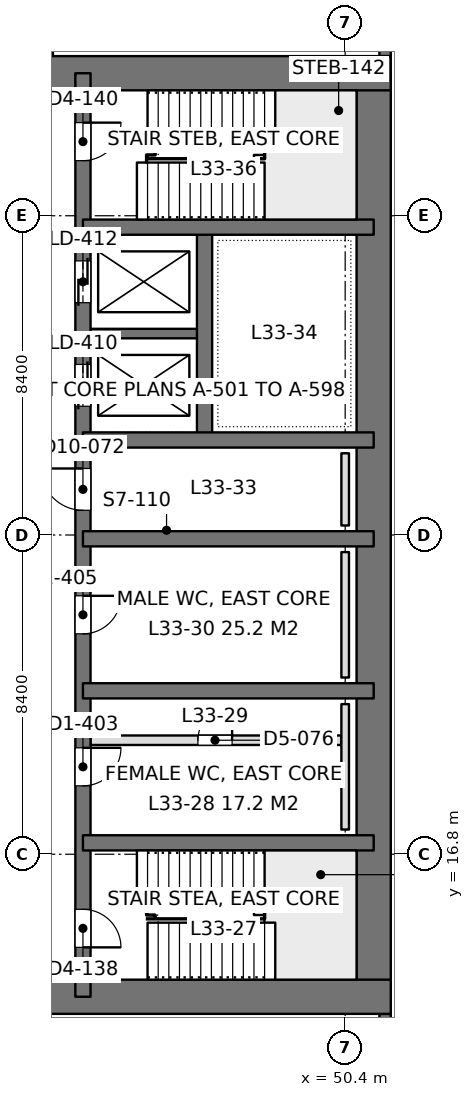
"""IFC4 building model, lengths in metres.
Left out: names, types, materials, properties, quantities, classifications, styles, units other than length and angle.
Written with IfcOpenShell. Run it as: python <this file> out.ifc"""

import sys

from ifc_helpers import new_model, si_unit, direction, frame, frame_2d, origin, place, context, subcontext, project, spatial, rectangle, extrude, element, fill, save


model = new_model("IFC4")
c1 = context("Model", 3, precision=1e-05, world=origin(), true_north=direction((0.0, 1.0)))
c2 = subcontext(c1, "Body", "Model", "MODEL_VIEW")
j1 = project(units=[si_unit("LENGTHUNIT", "METRE"), si_unit("PLANEANGLEUNIT", "RADIAN")], contexts=[c1])
p1 = place(None, origin())
s1 = spatial("IfcSite", under=j1, at=p1, CompositionType="ELEMENT")
p2 = place(p1, origin())
s2 = spatial("IfcBuilding", under=s1, at=p2, CompositionType="ELEMENT")
p3 = place(p2, frame((0.0, 0.0, 147.0)))
s3 = spatial("IfcBuildingStorey", under=s2, at=p3, CompositionType="ELEMENT", Elevation=147.0)
p4 = place(p3, frame((33.6, 13.05, 0.0), z_axis=(0.0, 0.0, 1.0), x_axis=(1.0, 0.0, 0.0)))
e1 = element("IfcWall", 1, at=p4, inside=s3, PredefinedType="SHEAR", context=c2, shape_type="SweptSolid", body=[
    extrude(rectangle(XDim=18.0, YDim=0.9, at=frame_2d((9.0, 0.0))), origin(), (0.0, 0.0, 1.0), 4.2),
])
p5 = place(p4, frame((7.25, 0.0, 0.0)))
e2 = element("IfcOpeningElement", 2, at=p5, cuts=e1, PredefinedType="OPENING", context=c2, shape_type="SweptSolid", body=[
    extrude(rectangle(XDim=1.8, YDim=2.4, at=frame_2d((0.9, 1.2))), frame((0.0, 0.46, 0.0), z_axis=(0.0, -1.0, 0.0), x_axis=(1.0, 0.0, 0.0)), (0.0, 0.0, 1.0), 0.92),
])
p6 = place(p3, frame((33.6, 37.35, 0.0), z_axis=(0.0, 0.0, 1.0), x_axis=(1.0, 0.0, 0.0)))
e3 = element("IfcWall", 3, at=p6, inside=s3, PredefinedType="SHEAR", context=c2, shape_type="SweptSolid", body=[
    extrude(rectangle(XDim=18.0, YDim=0.9, at=frame_2d((9.0, 0.0))), origin(), (0.0, 0.0, 1.0), 4.2),
])
p7 = place(p6, frame((7.25, 0.0, 0.0)))
e4 = element("IfcOpeningElement", 4, at=p7, cuts=e3, PredefinedType="OPENING", context=c2, shape_type="SweptSolid", body=[
    extrude(rectangle(XDim=1.8, YDim=2.4, at=frame_2d((0.9, 1.2))), frame((0.0, 0.46, 0.0), z_axis=(0.0, -1.0, 0.0), x_axis=(1.0, 0.0, 0.0)), (0.0, 0.0, 1.0), 0.92),
])
p8 = place(p3, frame((51.15, 13.05, 0.0), z_axis=(0.0, 0.0, 1.0), x_axis=(0.0, 1.0, 0.0)))
e5 = element("IfcWall", 5, at=p8, inside=s3, PredefinedType="SHEAR", context=c2, shape_type="SweptSolid", body=[
    extrude(rectangle(XDim=24.3, YDim=0.9, at=frame_2d((12.15, 0.0))), origin(), (0.0, 0.0, 1.0), 4.2),
])
p9 = place(p3, frame((43.5, 13.05, 0.0), z_axis=(0.0, 0.0, 1.0), x_axis=(0.0, 1.0, 0.0)))
e6 = element("IfcWall", 6, at=p9, inside=s3, PredefinedType="SHEAR", context=c2, shape_type="SweptSolid", body=[
    extrude(rectangle(XDim=24.3, YDim=0.4, at=frame_2d((12.15, 0.0))), origin(), (0.0, 0.0, 1.0), 4.2),
])
p10 = place(p9, frame((1.3, 0.0, 0.0)))
e7 = element("IfcOpeningElement", 7, at=p10, cuts=e6, PredefinedType="OPENING", context=c2, shape_type="SweptSolid", body=[
    extrude(rectangle(XDim=1.0, YDim=2.2, at=frame_2d((0.5, 1.1))), frame((0.0, 0.21, 0.0), z_axis=(0.0, -1.0, 0.0), x_axis=(1.0, 0.0, 0.0)), (0.0, 0.0, 1.0), 0.42),
])
p11 = place(p9, frame((22.0, 0.0, 0.0)))
e8 = element("IfcOpeningElement", 8, at=p11, cuts=e6, PredefinedType="OPENING", context=c2, shape_type="SweptSolid", body=[
    extrude(rectangle(XDim=1.0, YDim=2.2, at=frame_2d((0.5, 1.1))), frame((0.0, 0.21, 0.0), z_axis=(0.0, -1.0, 0.0), x_axis=(1.0, 0.0, 0.0)), (0.0, 0.0, 1.0), 0.42),
])
p12 = place(p9, frame((5.55, 0.0, 0.0)))
e9 = element("IfcOpeningElement", 9, at=p12, cuts=e6, PredefinedType="OPENING", context=c2, shape_type="SweptSolid", body=[
    extrude(rectangle(XDim=1.0, YDim=2.2, at=frame_2d((0.5, 1.1))), frame((0.0, 0.21, 0.0), z_axis=(0.0, -1.0, 0.0), x_axis=(1.0, 0.0, 0.0)), (0.0, 0.0, 1.0), 0.42),
])
p13 = place(p9, frame((9.55, 0.0, 0.0)))
e10 = element("IfcOpeningElement", 10, at=p13, cuts=e6, PredefinedType="OPENING", context=c2, shape_type="SweptSolid", body=[
    extrude(rectangle(XDim=1.0, YDim=2.2, at=frame_2d((0.5, 1.1))), frame((0.0, 0.21, 0.0), z_axis=(0.0, -1.0, 0.0), x_axis=(1.0, 0.0, 0.0)), (0.0, 0.0, 1.0), 0.42),
])
p14 = place(p9, frame((12.8, 0.0, 0.0)))
e11 = element("IfcOpeningElement", 11, at=p14, cuts=e6, PredefinedType="OPENING", context=c2, shape_type="SweptSolid", body=[
    extrude(rectangle(XDim=1.1, YDim=2.2, at=frame_2d((0.55, 1.1))), frame((0.0, 0.21, 0.0), z_axis=(0.0, -1.0, 0.0), x_axis=(1.0, 0.0, 0.0)), (0.0, 0.0, 1.0), 0.42),
])
p15 = place(p9, frame((15.538, 0.0, 0.0)))
e12 = element("IfcOpeningElement", 12, at=p15, cuts=e6, PredefinedType="OPENING", context=c2, shape_type="SweptSolid", body=[
    extrude(rectangle(XDim=1.1, YDim=2.2, at=frame_2d((0.55, 1.1))), frame((0.0, 0.21, 0.0), z_axis=(0.0, -1.0, 0.0), x_axis=(1.0, 0.0, 0.0)), (0.0, 0.0, 1.0), 0.42),
])
p16 = place(p9, frame((18.262, 0.0, 0.0)))
e13 = element("IfcOpeningElement", 13, at=p16, cuts=e6, PredefinedType="OPENING", context=c2, shape_type="SweptSolid", body=[
    extrude(rectangle(XDim=1.1, YDim=2.2, at=frame_2d((0.55, 1.1))), frame((0.0, 0.21, 0.0), z_axis=(0.0, -1.0, 0.0), x_axis=(1.0, 0.0, 0.0)), (0.0, 0.0, 1.0), 0.42),
])
for number, where, z_axis, x_axis in (
    (14, (51.15, 17.1, 0.0), (0.0, 0.0, 1.0), (-1.0, 0.0, 0.0)),
    (15, (51.15, 21.1, 0.0), (0.0, 0.0, 1.0), (-1.0, 0.0, 0.0)),
    (16, (51.15, 25.1, 0.0), (0.0, 0.0, 1.0), (-1.0, 0.0, 0.0)),
    (17, (51.15, 27.7, 0.0), (0.0, 0.0, 1.0), (-1.0, 0.0, 0.0)),
    (18, (51.15, 33.3, 0.0), (0.0, 0.0, 1.0), (-1.0, 0.0, 0.0)),
):
    element("IfcWall", number, at=place(p3, frame(where, z_axis=z_axis, x_axis=x_axis)), inside=s3, PredefinedType="SHEAR", context=c2, shape_type="SweptSolid", body=[
        extrude(rectangle(XDim=7.65, YDim=0.4, at=frame_2d((3.825, 0.0))), origin(), (0.0, 0.0, 1.0), 4.2),
    ])
p17 = place(p3, frame((46.7, 27.7, 0.0), z_axis=(0.0, 0.0, 1.0), x_axis=(0.0, 1.0, 0.0)))
e19 = element("IfcWall", 19, at=p17, inside=s3, PredefinedType="SHEAR", context=c2, shape_type="SweptSolid", body=[
    extrude(rectangle(XDim=5.6, YDim=0.4, at=frame_2d((2.8, 0.0))), origin(), (0.0, 0.0, 1.0), 4.2),
])
p18 = place(p3, frame((46.7, 30.5, 0.0), z_axis=(0.0, 0.0, 1.0), x_axis=(-1.0, 0.0, 0.0)))
e20 = element("IfcWall", 20, at=p18, inside=s3, PredefinedType="SHEAR", context=c2, shape_type="SweptSolid", body=[
    extrude(rectangle(XDim=3.2, YDim=0.25, at=frame_2d((1.6, 0.0))), origin(), (0.0, 0.0, 1.0), 4.2),
])
p19 = place(p3, frame((51.45, 42.0, 0.0), z_axis=(0.0, 0.0, 1.0), x_axis=(0.0, -1.0, 0.0)))
e21 = element("IfcWall", 21, at=p19, inside=s3, PredefinedType="SOLIDWALL", context=c2, shape_type="SweptSolid", body=[
    extrude(rectangle(XDim=4.2, YDim=0.3, at=frame_2d((2.1, 0.0))), origin(), (0.0, 0.0, 1.0), 4.05),
])
p20 = place(p19, frame((0.9, 0.0, 0.9)))
e22 = element("IfcOpeningElement", 22, at=p20, cuts=e21, PredefinedType="OPENING", context=c2, shape_type="SweptSolid", body=[
    extrude(rectangle(XDim=2.4, YDim=1.9, at=frame_2d((1.2, 0.95))), frame((0.0, 0.16, 0.0), z_axis=(0.0, -1.0, 0.0), x_axis=(1.0, 0.0, 0.0)), (0.0, 0.0, 1.0), 0.32),
])
p21 = place(p3, frame((51.45, 12.6, 0.0), z_axis=(0.0, 0.0, 1.0), x_axis=(0.0, -1.0, 0.0)))
e23 = element("IfcWall", 23, at=p21, inside=s3, PredefinedType="SOLIDWALL", context=c2, shape_type="SweptSolid", body=[
    extrude(rectangle(XDim=4.2, YDim=0.3, at=frame_2d((2.1, 0.0))), origin(), (0.0, 0.0, 1.0), 4.05),
])
p22 = place(p21, frame((0.9, 0.0, 0.9)))
e24 = element("IfcOpeningElement", 24, at=p22, cuts=e23, PredefinedType="OPENING", context=c2, shape_type="SweptSolid", body=[
    extrude(rectangle(XDim=2.4, YDim=1.9, at=frame_2d((1.2, 0.95))), frame((0.0, 0.16, 0.0), z_axis=(0.0, -1.0, 0.0), x_axis=(1.0, 0.0, 0.0)), (0.0, 0.0, 1.0), 0.32),
])
p23 = place(p3, frame((42.65, 37.8, 0.0), z_axis=(0.0, 0.0, 1.0), x_axis=(0.0, 1.0, 0.0)))
e25 = element("IfcWall", 25, at=p23, inside=s3, PredefinedType="PARTITIONING", context=c2, shape_type="SweptSolid", body=[
    extrude(rectangle(XDim=2.0, YDim=0.12, at=frame_2d((1.0, 0.0))), origin(), (0.0, 0.0, 1.0), 4.05),
])
p24 = place(p3, frame((43.7, 19.8, 0.0), z_axis=(0.0, 0.0, 1.0), x_axis=(1.0, 0.0, 0.0)))
e26 = element("IfcWall", 26, at=p24, inside=s3, PredefinedType="PARTITIONING", context=c2, shape_type="SweptSolid", body=[
    extrude(rectangle(XDim=6.6, YDim=0.25, at=frame_2d((3.3, 0.0))), origin(), (0.0, 0.0, 1.0), 4.0),
])
p25 = place(p24, frame((2.825, 0.0, 0.0)))
e27 = element("IfcOpeningElement", 27, at=p25, cuts=e26, PredefinedType="OPENING", context=c2, shape_type="SweptSolid", body=[
    extrude(rectangle(XDim=0.9, YDim=2.2, at=frame_2d((0.45, 1.1))), frame((0.0, 0.135, 0.0), z_axis=(0.0, -1.0, 0.0), x_axis=(1.0, 0.0, 0.0)), (0.0, 0.0, 1.0), 0.27),
])
for number, where, z_axis, x_axis in (
    (28, (50.4, 17.45, 0.0), (0.0, 0.0, 1.0), (0.0, 1.0, 0.0)),
    (29, (50.4, 21.45, 0.0), (0.0, 0.0, 1.0), (0.0, 1.0, 0.0)),
):
    element("IfcWall", number, at=place(p3, frame(where, z_axis=z_axis, x_axis=x_axis)), inside=s3, PredefinedType="PLUMBINGWALL", context=c2, shape_type="SweptSolid", body=[
        extrude(rectangle(XDim=3.3, YDim=0.2, at=frame_2d((1.65, 0.0))), origin(), (0.0, 0.0, 1.0), 1.2),
    ])
p26 = place(p3, frame((50.4, 25.45, 0.0), z_axis=(0.0, 0.0, 1.0), x_axis=(0.0, 1.0, 0.0)))
e30 = element("IfcWall", 30, at=p26, inside=s3, PredefinedType="PLUMBINGWALL", context=c2, shape_type="SweptSolid", body=[
    extrude(rectangle(XDim=1.9, YDim=0.2, at=frame_2d((0.95, 0.0))), origin(), (0.0, 0.0, 1.0), 1.2),
])
p27 = place(p10, frame((1.0, 0.0, 0.0), z_axis=(0.0, 0.0, 1.0), x_axis=(-1.0, 0.0, 0.0)))
e31 = element("IfcDoor", 31, at=p27, inside=s3, OperationType="SINGLE_SWING_RIGHT", PredefinedType="DOOR", context=c2, shape_type="SweptSolid", body=[
    extrude(rectangle(XDim=1.0, YDim=2.2, at=frame_2d((0.5, 1.1))), frame((0.0, 0.025, 0.0), z_axis=(0.0, -1.0, 0.0), x_axis=(1.0, 0.0, 0.0)), (0.0, 0.0, 1.0), 0.05),
])
fill(e7, e31)
p28 = place(p11, frame((1.0, 0.0, 0.0), z_axis=(0.0, 0.0, 1.0), x_axis=(-1.0, 0.0, 0.0)))
e32 = element("IfcDoor", 32, at=p28, inside=s3, OperationType="SINGLE_SWING_LEFT", PredefinedType="DOOR", context=c2, shape_type="SweptSolid", body=[
    extrude(rectangle(XDim=1.0, YDim=2.2, at=frame_2d((0.5, 1.1))), frame((0.0, 0.025, 0.0), z_axis=(0.0, -1.0, 0.0), x_axis=(1.0, 0.0, 0.0)), (0.0, 0.0, 1.0), 0.05),
])
fill(e8, e32)
p29 = place(p12, frame((1.0, 0.0, 0.0), z_axis=(0.0, 0.0, 1.0), x_axis=(-1.0, 0.0, 0.0)))
e33 = element("IfcDoor", 33, at=p29, inside=s3, OperationType="SINGLE_SWING_LEFT", PredefinedType="DOOR", context=c2, shape_type="SweptSolid", body=[
    extrude(rectangle(XDim=1.0, YDim=2.2, at=frame_2d((0.5, 1.1))), frame((0.0, 0.025, 0.0), z_axis=(0.0, -1.0, 0.0), x_axis=(1.0, 0.0, 0.0)), (0.0, 0.0, 1.0), 0.05),
])
fill(e9, e33)
p30 = place(p13, frame((1.0, 0.0, 0.0), z_axis=(0.0, 0.0, 1.0), x_axis=(-1.0, 0.0, 0.0)))
e34 = element("IfcDoor", 34, at=p30, inside=s3, OperationType="SINGLE_SWING_LEFT", PredefinedType="DOOR", context=c2, shape_type="SweptSolid", body=[
    extrude(rectangle(XDim=1.0, YDim=2.2, at=frame_2d((0.5, 1.1))), frame((0.0, 0.025, 0.0), z_axis=(0.0, -1.0, 0.0), x_axis=(1.0, 0.0, 0.0)), (0.0, 0.0, 1.0), 0.05),
])
fill(e10, e34)
p31 = place(p14, origin())
e35 = element("IfcDoor", 35, at=p31, inside=s3, OperationType="SINGLE_SWING_RIGHT", PredefinedType="DOOR", context=c2, shape_type="SweptSolid", body=[
    extrude(rectangle(XDim=1.1, YDim=2.2, at=frame_2d((0.55, 1.1))), frame((0.0, 0.025, 0.0), z_axis=(0.0, -1.0, 0.0), x_axis=(1.0, 0.0, 0.0)), (0.0, 0.0, 1.0), 0.05),
])
fill(e11, e35)
p32 = place(p15, origin())
e36 = element("IfcDoor", 36, at=p32, inside=s3, OperationType="DOUBLE_DOOR_SLIDING", PredefinedType="DOOR", context=c2, shape_type="SweptSolid", body=[
    extrude(rectangle(XDim=1.1, YDim=2.2, at=frame_2d((0.55, 1.1))), frame((0.0, 0.025, 0.0), z_axis=(0.0, -1.0, 0.0), x_axis=(1.0, 0.0, 0.0)), (0.0, 0.0, 1.0), 0.05),
])
fill(e12, e36)
p33 = place(p16, origin())
e37 = element("IfcDoor", 37, at=p33, inside=s3, OperationType="DOUBLE_DOOR_SLIDING", PredefinedType="DOOR", context=c2, shape_type="SweptSolid", body=[
    extrude(rectangle(XDim=1.1, YDim=2.2, at=frame_2d((0.55, 1.1))), frame((0.0, 0.025, 0.0), z_axis=(0.0, -1.0, 0.0), x_axis=(1.0, 0.0, 0.0)), (0.0, 0.0, 1.0), 0.05),
])
fill(e13, e37)
p34 = place(p25, origin())
e38 = element("IfcDoor", 38, at=p34, inside=s3, OperationType="SINGLE_SWING_RIGHT", PredefinedType="DOOR", context=c2, shape_type="SweptSolid", body=[
    extrude(rectangle(XDim=0.9, YDim=2.2, at=frame_2d((0.45, 1.1))), frame((0.0, 0.025, 0.0), z_axis=(0.0, -1.0, 0.0), x_axis=(1.0, 0.0, 0.0)), (0.0, 0.0, 1.0), 0.05),
])
fill(e27, e38)
save(model, sys.argv[1])
